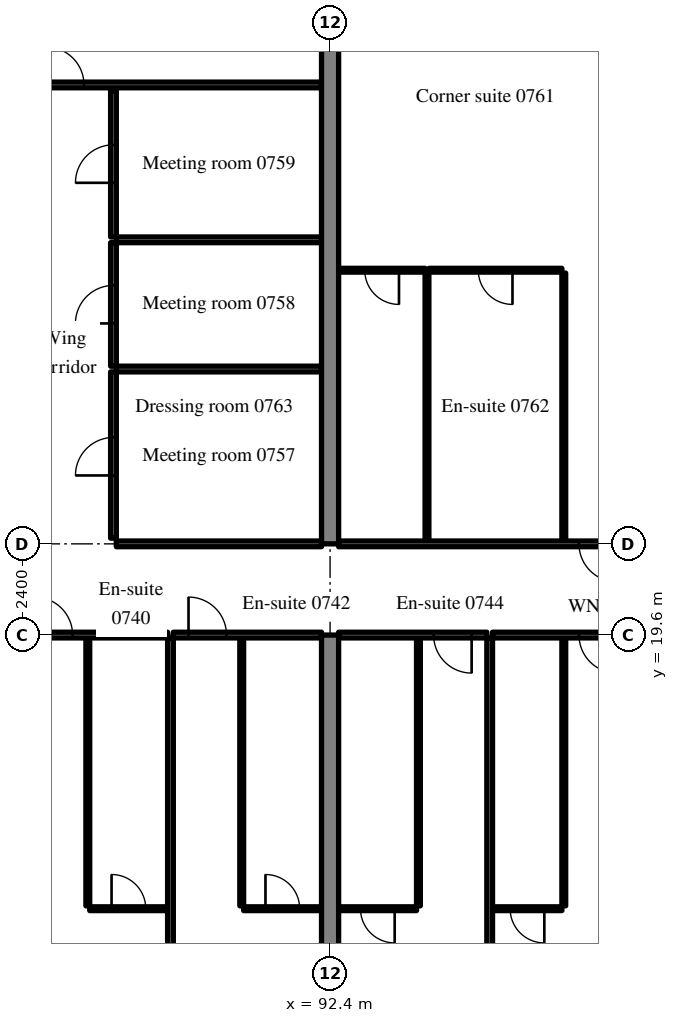
"""IFC4 building model, lengths in metres.
Left out: names, types, materials, properties, quantities, classifications, styles, units other than length and angle.
Written with IfcOpenShell. Run it as: python <this file> out.ifc"""

import sys

from ifc_helpers import new_model, si_unit, direction, frame, frame_2d, origin, place, context, subcontext, project, spatial, rectangle, extrude, source, transform, mapped, element, fill, save


model = new_model("IFC4")
c1 = context("Model", 3, precision=1e-05, world=origin(), true_north=direction((0.0, 1.0)))
c2 = subcontext(c1, "Body", "Model", "MODEL_VIEW")
j1 = project(units=[si_unit("LENGTHUNIT", "METRE"), si_unit("PLANEANGLEUNIT", "RADIAN")], contexts=[c1])
p1 = place(None, origin())
s1 = spatial("IfcSite", under=j1, at=p1, CompositionType="ELEMENT")
p2 = place(p1, origin())
s2 = spatial("IfcBuilding", under=s1, at=p2, CompositionType="ELEMENT")
p3 = place(p2, frame((0.0, 0.0, 35.4)))
s3 = spatial("IfcBuildingStorey", under=s2, at=p3, CompositionType="ELEMENT", Elevation=35.4)
m1 = source(origin(), c2, "Body", "SweptSolid", [
    extrude(rectangle(XDim=19.6, YDim=0.45, at=frame_2d((9.8, 0.0))), origin(), (0.0, 0.0, 1.0), 3.52),
])
p4 = place(p3, frame((92.4, 0.0, 0.0), z_axis=(0.0, 0.0, 1.0), x_axis=(0.0, 1.0, 0.0)))
e1 = element("IfcWall", 1, at=p4, inside=s3, PredefinedType="SHEAR", context=c2, shape_type="MappedRepresentation", body=[
    mapped(m1, transform((0.0, 0.0, 0.0), scale=1.0)),
])
m2 = source(origin(), c2, "Body", "SweptSolid", [
    extrude(rectangle(XDim=20.0, YDim=0.45, at=frame_2d((10.0, 0.0))), origin(), (0.0, 0.0, 1.0), 3.52),
])
p5 = place(p3, frame((92.4, 22.0, 0.0), z_axis=(0.0, 0.0, 1.0), x_axis=(0.0, 1.0, 0.0)))
e2 = element("IfcWall", 2, at=p5, inside=s3, PredefinedType="SHEAR", context=c2, shape_type="MappedRepresentation", body=[
    mapped(m2, transform((0.0, 0.0, 0.0), scale=1.0)),
])
m3 = source(origin(), c2, "Body", "SweptSolid", [
    extrude(rectangle(XDim=7.05, YDim=0.1, at=frame_2d((3.525, 0.0))), origin(), (0.0, 0.0, 1.0), 3.52),
])
p6 = place(p3, frame((86.025, 12.475, 0.0), z_axis=(0.0, 0.0, 1.0), x_axis=(0.0, 1.0, 0.0)))
e3 = element("IfcWall", 3, at=p6, inside=s3, PredefinedType="PARTITIONING", context=c2, shape_type="MappedRepresentation", body=[
    mapped(m3, transform((0.0, 0.0, 0.0), scale=1.0)),
])
m4 = source(origin(), c2, "Body", "SweptSolid", [
    extrude(rectangle(XDim=2.05, YDim=0.1, at=frame_2d((1.025, 0.0))), origin(), (0.0, 0.0, 1.0), 3.52),
])
p7 = place(p3, frame((86.075, 12.4, 0.0), z_axis=(0.0, 0.0, 1.0), x_axis=(1.0, 0.0, 0.0)))
e4 = element("IfcWall", 4, at=p7, inside=s3, PredefinedType="PARTITIONING", context=c2, shape_type="MappedRepresentation", body=[
    mapped(m4, transform((0.0, 0.0, 0.0), scale=1.0)),
])
m5 = source(origin(), c2, "Body", "SweptSolid", [
    extrude(rectangle(XDim=0.9, YDim=2.1, at=frame_2d((0.45, 1.05))), frame((0.0, 0.06, 0.0), z_axis=(0.0, -1.0, 0.0), x_axis=(1.0, 0.0, 0.0)), (0.0, 0.0, 1.0), 0.12),
])
p8 = place(p7, frame((0.575, 0.0, 0.0)))
e5 = element("IfcOpeningElement", 5, at=p8, cuts=e4, PredefinedType="OPENING", context=c2, shape_type="MappedRepresentation", body=[
    mapped(m5, transform((0.0, 0.0, 0.0), scale=1.0)),
])
m6 = source(origin(), c2, "Body", "SweptSolid", [
    extrude(rectangle(XDim=3.9, YDim=0.15, at=frame_2d((1.95, 0.0))), origin(), (0.0, 0.0, 1.0), 2.82),
])
p9 = place(p3, frame((84.225, 19.6, 0.0), z_axis=(0.0, 0.0, 1.0), x_axis=(1.0, 0.0, 0.0)))
e6 = element("IfcWall", 6, at=p9, inside=s3, PredefinedType="PARTITIONING", context=c2, shape_type="MappedRepresentation", body=[
    mapped(m6, transform((0.0, 0.0, 0.0), scale=1.0)),
])
m7 = source(origin(), c2, "Body", "SweptSolid", [
    extrude(rectangle(XDim=1.0, YDim=2.1, at=frame_2d((0.5, 1.05))), frame((0.0, 0.085, 0.0), z_axis=(0.0, -1.0, 0.0), x_axis=(1.0, 0.0, 0.0)), (0.0, 0.0, 1.0), 0.17),
])
p10 = place(p9, frame((0.4, 0.0, 0.0)))
e7 = element("IfcOpeningElement", 7, at=p10, cuts=e6, PredefinedType="OPENING", context=c2, shape_type="MappedRepresentation", body=[
    mapped(m7, transform((0.0, 0.0, 0.0), scale=1.0)),
])
p11 = place(p3, frame((90.075, 12.475, 0.0), z_axis=(0.0, 0.0, 1.0), x_axis=(0.0, 1.0, 0.0)))
e8 = element("IfcWall", 8, at=p11, inside=s3, PredefinedType="PARTITIONING", context=c2, shape_type="MappedRepresentation", body=[
    mapped(m3, transform((0.0, 0.0, 0.0), scale=1.0)),
])
p12 = place(p3, frame((90.125, 12.4, 0.0), z_axis=(0.0, 0.0, 1.0), x_axis=(1.0, 0.0, 0.0)))
e9 = element("IfcWall", 9, at=p12, inside=s3, PredefinedType="PARTITIONING", context=c2, shape_type="MappedRepresentation", body=[
    mapped(m4, transform((0.0, 0.0, 0.0), scale=1.0)),
])
p13 = place(p12, frame((0.575, 0.0, 0.0)))
e10 = element("IfcOpeningElement", 10, at=p13, cuts=e9, PredefinedType="OPENING", context=c2, shape_type="MappedRepresentation", body=[
    mapped(m5, transform((0.0, 0.0, 0.0), scale=1.0)),
])
m8 = source(origin(), c2, "Body", "SweptSolid", [
    extrude(rectangle(XDim=3.9, YDim=0.15, at=frame_2d((1.95, 0.0))), origin(), (0.0, 0.0, 1.0), 2.82),
])
p14 = place(p3, frame((88.275, 19.6, 0.0), z_axis=(0.0, 0.0, 1.0), x_axis=(1.0, 0.0, 0.0)))
e11 = element("IfcWall", 11, at=p14, inside=s3, PredefinedType="PARTITIONING", context=c2, shape_type="MappedRepresentation", body=[
    mapped(m8, transform((0.0, 0.0, 0.0), scale=1.0)),
])
p15 = place(p14, frame((0.4, 0.0, 0.0)))
e12 = element("IfcOpeningElement", 12, at=p15, cuts=e11, PredefinedType="OPENING", context=c2, shape_type="MappedRepresentation", body=[
    mapped(m7, transform((0.0, 0.0, 0.0), scale=1.0)),
])
m9 = source(origin(), c2, "Body", "SweptSolid", [
    extrude(rectangle(XDim=18.625, YDim=0.15, at=frame_2d((9.312, 0.0))), origin(), (0.0, 0.0, 1.0), 3.52),
])
p16 = place(p3, frame((88.2, 0.9, 0.0), z_axis=(0.0, 0.0, 1.0), x_axis=(0.0, 1.0, 0.0)))
e13 = element("IfcWall", 13, at=p16, inside=s3, PredefinedType="PARTITIONING", context=c2, shape_type="MappedRepresentation", body=[
    mapped(m9, transform((0.0, 0.0, 0.0), scale=1.0)),
])
p17 = place(p3, frame((94.725, 12.475, 0.0), z_axis=(0.0, 0.0, 1.0), x_axis=(0.0, 1.0, 0.0)))
e14 = element("IfcWall", 14, at=p17, inside=s3, PredefinedType="PARTITIONING", context=c2, shape_type="MappedRepresentation", body=[
    mapped(m3, transform((0.0, 0.0, 0.0), scale=1.0)),
])
p18 = place(p3, frame((92.625, 12.4, 0.0), z_axis=(0.0, 0.0, 1.0), x_axis=(1.0, 0.0, 0.0)))
e15 = element("IfcWall", 15, at=p18, inside=s3, PredefinedType="PARTITIONING", context=c2, shape_type="MappedRepresentation", body=[
    mapped(m4, transform((0.0, 0.0, 0.0), scale=1.0)),
])
p19 = place(p18, frame((0.575, 0.0, 0.0)))
e16 = element("IfcOpeningElement", 16, at=p19, cuts=e15, PredefinedType="OPENING", context=c2, shape_type="MappedRepresentation", body=[
    mapped(m5, transform((0.0, 0.0, 0.0), scale=1.0)),
])
p20 = place(p3, frame((92.625, 19.6, 0.0), z_axis=(0.0, 0.0, 1.0), x_axis=(1.0, 0.0, 0.0)))
e17 = element("IfcWall", 17, at=p20, inside=s3, PredefinedType="PARTITIONING", context=c2, shape_type="MappedRepresentation", body=[
    mapped(m6, transform((0.0, 0.0, 0.0), scale=1.0)),
])
p21 = place(p20, frame((2.5, 0.0, 0.0)))
e18 = element("IfcOpeningElement", 18, at=p21, cuts=e17, PredefinedType="OPENING", context=c2, shape_type="MappedRepresentation", body=[
    mapped(m7, transform((0.0, 0.0, 0.0), scale=1.0)),
])
p22 = place(p3, frame((98.55, 12.475, 0.0), z_axis=(0.0, 0.0, 1.0), x_axis=(0.0, 1.0, 0.0)))
e19 = element("IfcWall", 19, at=p22, inside=s3, PredefinedType="PARTITIONING", context=c2, shape_type="MappedRepresentation", body=[
    mapped(m3, transform((0.0, 0.0, 0.0), scale=1.0)),
])
m10 = source(origin(), c2, "Body", "SweptSolid", [
    extrude(rectangle(XDim=1.825, YDim=0.1, at=frame_2d((0.913, 0.0))), origin(), (0.0, 0.0, 1.0), 3.52),
])
p23 = place(p3, frame((96.675, 12.4, 0.0), z_axis=(0.0, 0.0, 1.0), x_axis=(1.0, 0.0, 0.0)))
e20 = element("IfcWall", 20, at=p23, inside=s3, PredefinedType="PARTITIONING", context=c2, shape_type="MappedRepresentation", body=[
    mapped(m10, transform((0.0, 0.0, 0.0), scale=1.0)),
])
p24 = place(p23, frame((0.463, 0.0, 0.0)))
e21 = element("IfcOpeningElement", 21, at=p24, cuts=e20, PredefinedType="OPENING", context=c2, shape_type="MappedRepresentation", body=[
    mapped(m5, transform((0.0, 0.0, 0.0), scale=1.0)),
])
m11 = source(origin(), c2, "Body", "SweptSolid", [
    extrude(rectangle(XDim=3.675, YDim=0.15, at=frame_2d((1.837, 0.0))), origin(), (0.0, 0.0, 1.0), 2.82),
])
p25 = place(p3, frame((96.675, 19.6, 0.0), z_axis=(0.0, 0.0, 1.0), x_axis=(1.0, 0.0, 0.0)))
e22 = element("IfcWall", 22, at=p25, inside=s3, PredefinedType="PARTITIONING", context=c2, shape_type="MappedRepresentation", body=[
    mapped(m11, transform((0.0, 0.0, 0.0), scale=1.0)),
])
p26 = place(p25, frame((2.275, 0.0, 0.0)))
e23 = element("IfcOpeningElement", 23, at=p26, cuts=e22, PredefinedType="OPENING", context=c2, shape_type="MappedRepresentation", body=[
    mapped(m7, transform((0.0, 0.0, 0.0), scale=1.0)),
])
m12 = source(origin(), c2, "Body", "SweptSolid", [
    extrude(rectangle(XDim=18.947, YDim=0.15, at=frame_2d((9.474, 0.0))), origin(), (0.0, 0.0, 1.0), 3.52),
])
p27 = place(p3, frame((96.6, 0.578, 0.0), z_axis=(0.0, 0.0, 1.0), x_axis=(0.0, 1.0, 0.0)))
e24 = element("IfcWall", 24, at=p27, inside=s3, PredefinedType="PARTITIONING", context=c2, shape_type="MappedRepresentation", body=[
    mapped(m12, transform((0.0, 0.0, 0.0), scale=1.0)),
])
m13 = source(origin(), c2, "Body", "SweptSolid", [
    extrude(rectangle(XDim=5.4, YDim=0.15, at=frame_2d((2.7, 0.0))), origin(), (0.0, 0.0, 1.0), 2.82),
])
p28 = place(p3, frame((86.775, 22.0, 0.0), z_axis=(0.0, 0.0, 1.0), x_axis=(1.0, 0.0, 0.0)))
e25 = element("IfcWall", 25, at=p28, inside=s3, PredefinedType="PARTITIONING", context=c2, shape_type="MappedRepresentation", body=[
    mapped(m13, transform((0.0, 0.0, 0.0), scale=1.0)),
])
m14 = source(origin(), c2, "Body", "SweptSolid", [
    extrude(rectangle(XDim=4.375, YDim=0.15, at=frame_2d((2.188, 0.0))), origin(), (0.0, 0.0, 1.0), 3.52),
])
p29 = place(p3, frame((86.7, 22.15, 0.0), z_axis=(0.0, 0.0, 1.0), x_axis=(0.0, 1.0, 0.0)))
e26 = element("IfcWall", 26, at=p29, inside=s3, PredefinedType="PARTITIONING", context=c2, shape_type="MappedRepresentation", body=[
    mapped(m14, transform((0.0, 0.0, 0.0), scale=1.0)),
])
p30 = place(p29, frame((1.65, 0.0, 0.0)))
e27 = element("IfcOpeningElement", 27, at=p30, cuts=e26, PredefinedType="OPENING", context=c2, shape_type="MappedRepresentation", body=[
    mapped(m7, transform((0.0, 0.0, 0.0), scale=1.0)),
])
m15 = source(origin(), c2, "Body", "SweptSolid", [
    extrude(rectangle(XDim=5.4, YDim=0.15, at=frame_2d((2.7, 0.0))), origin(), (0.0, 0.0, 1.0), 3.52),
])
p31 = place(p3, frame((86.775, 26.6, 0.0), z_axis=(0.0, 0.0, 1.0), x_axis=(1.0, 0.0, 0.0)))
e28 = element("IfcWall", 28, at=p31, inside=s3, PredefinedType="PARTITIONING", context=c2, shape_type="MappedRepresentation", body=[
    mapped(m15, transform((0.0, 0.0, 0.0), scale=1.0)),
])
m16 = source(origin(), c2, "Body", "SweptSolid", [
    extrude(rectangle(XDim=3.25, YDim=0.15, at=frame_2d((1.625, 0.0))), origin(), (0.0, 0.0, 1.0), 3.52),
])
p32 = place(p3, frame((86.7, 26.675, 0.0), z_axis=(0.0, 0.0, 1.0), x_axis=(0.0, 1.0, 0.0)))
e29 = element("IfcWall", 29, at=p32, inside=s3, PredefinedType="PARTITIONING", context=c2, shape_type="MappedRepresentation", body=[
    mapped(m16, transform((0.0, 0.0, 0.0), scale=1.0)),
])
p33 = place(p32, frame((1.125, 0.0, 0.0)))
e30 = element("IfcOpeningElement", 30, at=p33, cuts=e29, PredefinedType="OPENING", context=c2, shape_type="MappedRepresentation", body=[
    mapped(m7, transform((0.0, 0.0, 0.0), scale=1.0)),
])
p34 = place(p3, frame((86.775, 30.0, 0.0), z_axis=(0.0, 0.0, 1.0), x_axis=(1.0, 0.0, 0.0)))
e31 = element("IfcWall", 31, at=p34, inside=s3, PredefinedType="PARTITIONING", context=c2, shape_type="MappedRepresentation", body=[
    mapped(m15, transform((0.0, 0.0, 0.0), scale=1.0)),
])
m17 = source(origin(), c2, "Body", "SweptSolid", [
    extrude(rectangle(XDim=3.85, YDim=0.15, at=frame_2d((1.925, 0.0))), origin(), (0.0, 0.0, 1.0), 3.52),
])
p35 = place(p3, frame((86.7, 30.075, 0.0), z_axis=(0.0, 0.0, 1.0), x_axis=(0.0, 1.0, 0.0)))
e32 = element("IfcWall", 32, at=p35, inside=s3, PredefinedType="PARTITIONING", context=c2, shape_type="MappedRepresentation", body=[
    mapped(m17, transform((0.0, 0.0, 0.0), scale=1.0)),
])
p36 = place(p35, frame((1.425, 0.0, 0.0)))
e33 = element("IfcOpeningElement", 33, at=p36, cuts=e32, PredefinedType="OPENING", context=c2, shape_type="MappedRepresentation", body=[
    mapped(m7, transform((0.0, 0.0, 0.0), scale=1.0)),
])
m18 = source(origin(), c2, "Body", "SweptSolid", [
    extrude(rectangle(XDim=7.95, YDim=0.15, at=frame_2d((3.975, 0.0))), origin(), (0.0, 0.0, 1.0), 3.52),
])
p37 = place(p3, frame((84.225, 34.075, 0.0), z_axis=(0.0, 0.0, 1.0), x_axis=(1.0, 0.0, 0.0)))
e34 = element("IfcWall", 34, at=p37, inside=s3, PredefinedType="PARTITIONING", context=c2, shape_type="MappedRepresentation", body=[
    mapped(m18, transform((0.0, 0.0, 0.0), scale=1.0)),
])
p38 = place(p37, frame((0.7, 0.0, 0.0)))
e35 = element("IfcOpeningElement", 35, at=p38, cuts=e34, PredefinedType="OPENING", context=c2, shape_type="MappedRepresentation", body=[
    mapped(m7, transform((0.0, 0.0, 0.0), scale=1.0)),
])
m19 = source(origin(), c2, "Body", "SweptSolid", [
    extrude(rectangle(XDim=7.05, YDim=0.1, at=frame_2d((3.525, 0.0))), origin(), (0.0, 0.0, 1.0), 3.52),
])
for number, where, z_axis, x_axis in (
    (36, (98.55, 22.075, 0.0), (0.0, 0.0, 1.0), (0.0, 1.0, 0.0)),
    (37, (94.95, 22.075, 0.0), (0.0, 0.0, 1.0), (0.0, 1.0, 0.0)),
):
    element("IfcWall", number, at=place(p3, frame(where, z_axis=z_axis, x_axis=x_axis)), inside=s3, PredefinedType="PARTITIONING", context=c2, shape_type="MappedRepresentation", body=[
        mapped(m19, transform((0.0, 0.0, 0.0), scale=1.0)),
    ])
m20 = source(origin(), c2, "Body", "SweptSolid", [
    extrude(rectangle(XDim=3.5, YDim=0.1, at=frame_2d((1.75, 0.0))), origin(), (0.0, 0.0, 1.0), 3.52),
])
p39 = place(p3, frame((95.0, 29.2, 0.0), z_axis=(0.0, 0.0, 1.0), x_axis=(1.0, 0.0, 0.0)))
e38 = element("IfcWall", 38, at=p39, inside=s3, PredefinedType="PARTITIONING", context=c2, shape_type="MappedRepresentation", body=[
    mapped(m20, transform((0.0, 0.0, 0.0), scale=1.0)),
])
p40 = place(p39, frame((1.3, 0.0, 0.0)))
e39 = element("IfcOpeningElement", 39, at=p40, cuts=e38, PredefinedType="OPENING", context=c2, shape_type="MappedRepresentation", body=[
    mapped(m5, transform((0.0, 0.0, 0.0), scale=1.0)),
])
m21 = source(origin(), c2, "Body", "SweptSolid", [
    extrude(rectangle(XDim=2.275, YDim=0.1, at=frame_2d((1.137, 0.0))), origin(), (0.0, 0.0, 1.0), 3.52),
])
p41 = place(p3, frame((92.625, 29.2, 0.0), z_axis=(0.0, 0.0, 1.0), x_axis=(1.0, 0.0, 0.0)))
e40 = element("IfcWall", 40, at=p41, inside=s3, PredefinedType="PARTITIONING", context=c2, shape_type="MappedRepresentation", body=[
    mapped(m21, transform((0.0, 0.0, 0.0), scale=1.0)),
])
p42 = place(p41, frame((0.688, 0.0, 0.0)))
e41 = element("IfcOpeningElement", 41, at=p42, cuts=e40, PredefinedType="OPENING", context=c2, shape_type="MappedRepresentation", body=[
    mapped(m5, transform((0.0, 0.0, 0.0), scale=1.0)),
])
m22 = source(origin(), c2, "Body", "SweptSolid", [
    extrude(rectangle(XDim=7.725, YDim=0.15, at=frame_2d((3.863, 0.0))), origin(), (0.0, 0.0, 1.0), 2.82),
])
p43 = place(p3, frame((92.625, 22.0, 0.0), z_axis=(0.0, 0.0, 1.0), x_axis=(1.0, 0.0, 0.0)))
e42 = element("IfcWall", 42, at=p43, inside=s3, PredefinedType="PARTITIONING", context=c2, shape_type="MappedRepresentation", body=[
    mapped(m22, transform((0.0, 0.0, 0.0), scale=1.0)),
])
p44 = place(p43, frame((6.325, 0.0, 0.0)))
e43 = element("IfcOpeningElement", 43, at=p44, cuts=e42, PredefinedType="OPENING", context=c2, shape_type="MappedRepresentation", body=[
    mapped(m7, transform((0.0, 0.0, 0.0), scale=1.0)),
])
m23 = source(origin(), c2, "Body", "SweptSolid", [
    extrude(rectangle(XDim=0.9, YDim=2.1, at=frame_2d((0.45, 1.05))), frame((0.0, 0.025, 0.0), z_axis=(0.0, -1.0, 0.0), x_axis=(1.0, 0.0, 0.0)), (0.0, 0.0, 1.0), 0.05),
])
p45 = place(p8, origin())
e44 = element("IfcDoor", 44, at=p45, inside=s3, OperationType="SINGLE_SWING_LEFT", PredefinedType="DOOR", context=c2, shape_type="MappedRepresentation", body=[
    mapped(m23, transform((0.0, 0.0, 0.0), scale=1.0)),
])
fill(e5, e44)
m24 = source(origin(), c2, "Body", "SweptSolid", [
    extrude(rectangle(XDim=1.0, YDim=2.1, at=frame_2d((0.5, 1.05))), frame((0.0, 0.025, 0.0), z_axis=(0.0, -1.0, 0.0), x_axis=(1.0, 0.0, 0.0)), (0.0, 0.0, 1.0), 0.05),
])
p46 = place(p10, origin())
e45 = element("IfcDoor", 45, at=p46, inside=s3, OperationType="SINGLE_SWING_LEFT", PredefinedType="DOOR", context=c2, shape_type="MappedRepresentation", body=[
    mapped(m24, transform((0.0, 0.0, 0.0), scale=1.0)),
])
fill(e7, e45)
p47 = place(p13, origin())
e46 = element("IfcDoor", 46, at=p47, inside=s3, OperationType="SINGLE_SWING_LEFT", PredefinedType="DOOR", context=c2, shape_type="MappedRepresentation", body=[
    mapped(m23, transform((0.0, 0.0, 0.0), scale=1.0)),
])
fill(e10, e46)
p48 = place(p15, origin())
e47 = element("IfcDoor", 47, at=p48, inside=s3, OperationType="SINGLE_SWING_LEFT", PredefinedType="DOOR", context=c2, shape_type="MappedRepresentation", body=[
    mapped(m24, transform((0.0, 0.0, 0.0), scale=1.0)),
])
fill(e12, e47)
p49 = place(p19, origin())
e48 = element("IfcDoor", 48, at=p49, inside=s3, OperationType="SINGLE_SWING_RIGHT", PredefinedType="DOOR", context=c2, shape_type="MappedRepresentation", body=[
    mapped(m23, transform((0.0, 0.0, 0.0), scale=1.0)),
])
fill(e16, e48)
p50 = place(p21, origin())
e49 = element("IfcDoor", 49, at=p50, inside=s3, OperationType="SINGLE_SWING_RIGHT", PredefinedType="DOOR", context=c2, shape_type="MappedRepresentation", body=[
    mapped(m24, transform((0.0, 0.0, 0.0), scale=1.0)),
])
fill(e18, e49)
p51 = place(p24, origin())
e50 = element("IfcDoor", 50, at=p51, inside=s3, OperationType="SINGLE_SWING_RIGHT", PredefinedType="DOOR", context=c2, shape_type="MappedRepresentation", body=[
    mapped(m23, transform((0.0, 0.0, 0.0), scale=1.0)),
])
fill(e21, e50)
p52 = place(p26, origin())
e51 = element("IfcDoor", 51, at=p52, inside=s3, OperationType="SINGLE_SWING_RIGHT", PredefinedType="DOOR", context=c2, shape_type="MappedRepresentation", body=[
    mapped(m24, transform((0.0, 0.0, 0.0), scale=1.0)),
])
fill(e23, e51)
p53 = place(p30, origin())
e52 = element("IfcDoor", 52, at=p53, inside=s3, OperationType="SINGLE_SWING_LEFT", PredefinedType="DOOR", context=c2, shape_type="MappedRepresentation", body=[
    mapped(m24, transform((0.0, 0.0, 0.0), scale=1.0)),
])
fill(e27, e52)
p54 = place(p33, origin())
e53 = element("IfcDoor", 53, at=p54, inside=s3, OperationType="SINGLE_SWING_LEFT", PredefinedType="DOOR", context=c2, shape_type="MappedRepresentation", body=[
    mapped(m24, transform((0.0, 0.0, 0.0), scale=1.0)),
])
fill(e30, e53)
p55 = place(p36, origin())
e54 = element("IfcDoor", 54, at=p55, inside=s3, OperationType="SINGLE_SWING_LEFT", PredefinedType="DOOR", context=c2, shape_type="MappedRepresentation", body=[
    mapped(m24, transform((0.0, 0.0, 0.0), scale=1.0)),
])
fill(e33, e54)
p56 = place(p38, origin())
e55 = element("IfcDoor", 55, at=p56, inside=s3, OperationType="SINGLE_SWING_LEFT", PredefinedType="DOOR", context=c2, shape_type="MappedRepresentation", body=[
    mapped(m24, transform((0.0, 0.0, 0.0), scale=1.0)),
])
fill(e35, e55)
p57 = place(p40, origin())
e56 = element("IfcDoor", 56, at=p57, inside=s3, OperationType="SINGLE_SWING_RIGHT", PredefinedType="DOOR", context=c2, shape_type="MappedRepresentation", body=[
    mapped(m23, transform((0.0, 0.0, 0.0), scale=1.0)),
])
fill(e39, e56)
p58 = place(p42, origin())
e57 = element("IfcDoor", 57, at=p58, inside=s3, OperationType="SINGLE_SWING_RIGHT", PredefinedType="DOOR", context=c2, shape_type="MappedRepresentation", body=[
    mapped(m23, transform((0.0, 0.0, 0.0), scale=1.0)),
])
fill(e41, e57)
p59 = place(p44, origin())
e58 = element("IfcDoor", 58, at=p59, inside=s3, OperationType="SINGLE_SWING_RIGHT", PredefinedType="DOOR", context=c2, shape_type="MappedRepresentation", body=[
    mapped(m24, transform((0.0, 0.0, 0.0), scale=1.0)),
])
fill(e43, e58)
save(model, sys.argv[1])
